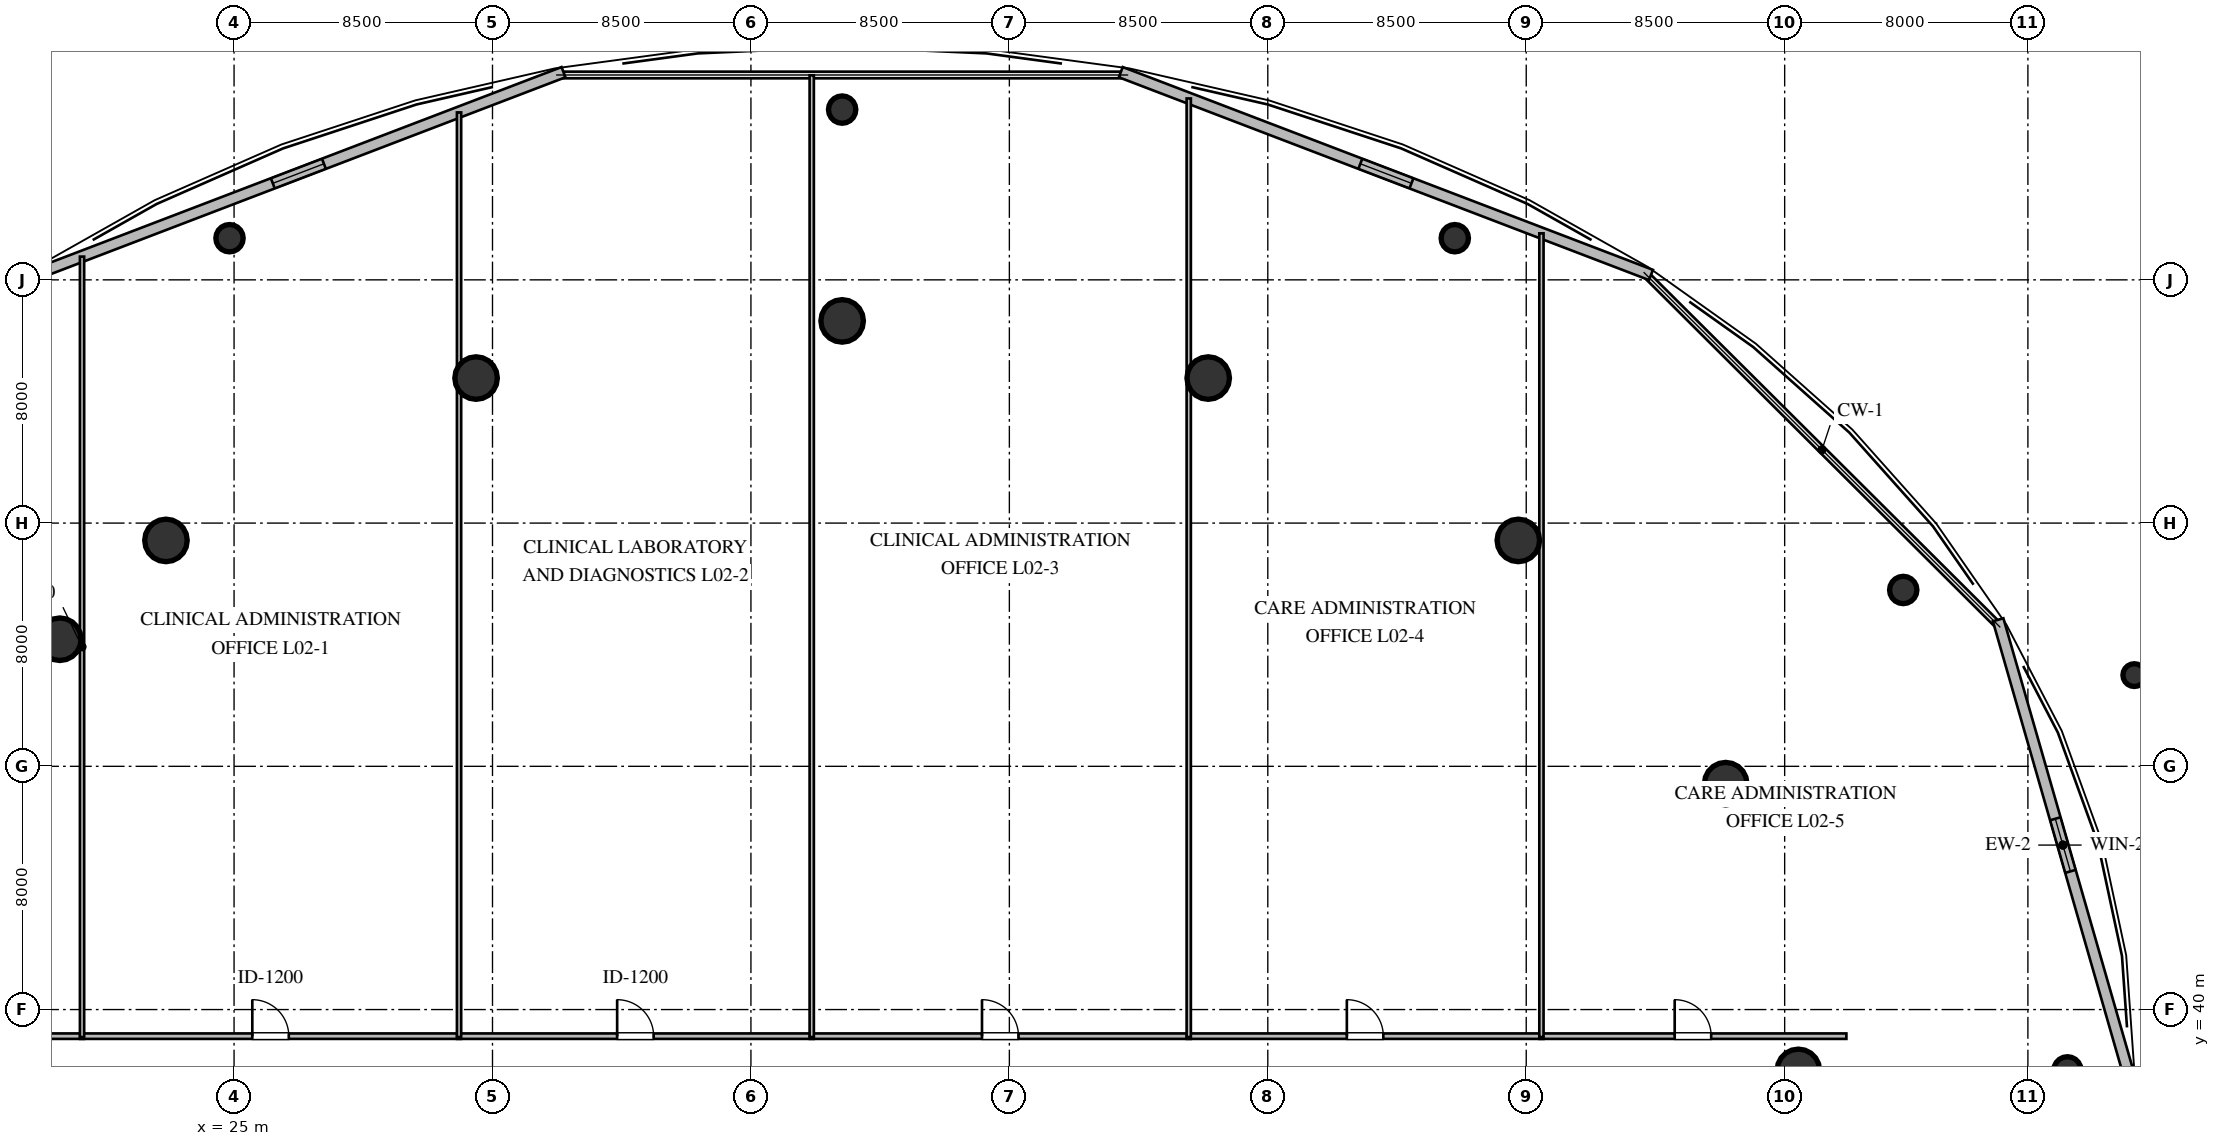
"""IFC4 building model, lengths in metres.
Left out: names, types, materials, properties, quantities, classifications, styles, units other than length and angle.
Written with IfcOpenShell. Run it as: python <this file> out.ifc"""

import sys

from ifc_helpers import new_model, si_unit, direction, frame, frame_2d, origin, origin_2d, place, context, subcontext, project, spatial, rectangle, circle, extrude, element, fill, save


model = new_model("IFC4")
c1 = context("Model", 3, precision=1e-05, world=origin(), true_north=direction((0.0, 1.0)))
c2 = subcontext(c1, "Body", "Model", "MODEL_VIEW")
j1 = project(units=[si_unit("LENGTHUNIT", "METRE"), si_unit("PLANEANGLEUNIT", "RADIAN")], contexts=[c1])
p1 = place(None, origin())
s1 = spatial("IfcSite", under=j1, at=p1, CompositionType="ELEMENT")
p2 = place(p1, origin())
s2 = spatial("IfcBuilding", under=s1, at=p2, CompositionType="ELEMENT")
p3 = place(p2, frame((0.0, 0.0, 9.6)))
s3 = spatial("IfcBuildingStorey", under=s2, at=p3, CompositionType="ELEMENT", Elevation=9.6)
for number, where, z_axis, x_axis in (
    (1, (76.45, 38.0, 0.0), (0.0, 0.0, 1.0), (1.0, 0.0, 0.0)),
    (2, (74.06, 47.43, 0.0), (0.0, 0.0, 1.0), (1.0, 0.0, 0.0)),
    (3, (67.24, 55.43, 0.0), (0.0, 0.0, 1.0), (1.0, 0.0, 0.0)),
    (4, (57.04, 60.77, 0.0), (0.0, 0.0, 1.0), (1.0, 0.0, 0.0)),
    (5, (45.0, 62.65, 0.0), (0.0, 0.0, 1.0), (1.0, 0.0, 0.0)),
    (6, (32.96, 60.77, 0.0), (0.0, 0.0, 1.0), (1.0, 0.0, 0.0)),
    (7, (22.76, 55.43, 0.0), (0.0, 0.0, 1.0), (1.0, 0.0, 0.0)),
    (8, (19.27, 52.18, 0.0), (0.0, 0.0, 1.0), (1.0, 0.0, 0.0)),
):
    element("IfcColumn", number, at=place(p3, frame(where, z_axis=z_axis, x_axis=x_axis)), inside=s3, PredefinedType="COLUMN", context=c2, shape_type="SweptSolid", body=[
        extrude(circle(Radius=0.7, at=origin_2d()), origin(), (0.0, 0.0, 1.0), 4.8),
    ])
for number, where, z_axis, x_axis in (
    (9, (85.3, 38.0, 0.0), (0.0, 0.0, 1.0), (1.0, 0.0, 0.0)),
    (10, (79.9, 53.8, 0.0), (0.0, 0.0, 1.0), (1.0, 0.0, 0.0)),
    (11, (65.15, 65.37, 0.0), (0.0, 0.0, 1.0), (1.0, 0.0, 0.0)),
    (12, (45.0, 69.6, 0.0), (0.0, 0.0, 1.0), (1.0, 0.0, 0.0)),
    (13, (24.85, 65.37, 0.0), (0.0, 0.0, 1.0), (1.0, 0.0, 0.0)),
):
    element("IfcColumn", number, at=place(p3, frame(where, z_axis=z_axis, x_axis=x_axis)), inside=s3, PredefinedType="COLUMN", context=c2, shape_type="SweptSolid", body=[
        extrude(circle(Radius=0.45, at=origin_2d()), origin(), (0.0, 0.0, 1.0), 4.8),
    ])
p4 = place(p3, frame((87.5, 51.0, 0.0), z_axis=(0.0, 0.0, 1.0), x_axis=(1.0, 0.0, 0.0)))
e14 = element("IfcColumn", 14, at=p4, inside=s3, PredefinedType="COLUMN", context=c2, shape_type="SweptSolid", body=[
    extrude(circle(Radius=0.375, at=origin_2d()), origin(), (0.0, 0.0, 1.0), 4.8),
])
p5 = place(p3, frame((87.28, 38.0, 0.0), z_axis=(0.0, 0.0, 1.0), x_axis=(-0.276203409751, 0.961099202186, 0.0)))
e15 = element("IfcWall", 15, at=p5, inside=s3, PredefinedType="STANDARD", context=c2, shape_type="SweptSolid", body=[
    extrude(rectangle(XDim=15.42, YDim=0.36, at=frame_2d((7.71, 0.0))), origin(), (0.0, 0.0, 1.0), 4.52),
])
p6 = place(p5, frame((6.81, 0.0, 1.05)))
e16 = element("IfcOpeningElement", 16, at=p6, cuts=e15, PredefinedType="OPENING", context=c2, shape_type="SweptSolid", body=[
    extrude(rectangle(XDim=1.8, YDim=1.7, at=frame_2d((0.9, 0.85))), frame((0.0, 0.19, 0.0), z_axis=(0.0, -1.0, 0.0), x_axis=(1.0, 0.0, 0.0)), (0.0, 0.0, 1.0), 0.38),
])
p7 = place(p3, frame((71.604, 64.161, 0.0), z_axis=(0.0, 0.0, 1.0), x_axis=(-0.934010262022, 0.357246176238, 0.0)))
e17 = element("IfcWall", 17, at=p7, inside=s3, PredefinedType="STANDARD", context=c2, shape_type="SweptSolid", body=[
    extrude(rectangle(XDim=18.671, YDim=0.36, at=frame_2d((9.335, 0.0))), origin(), (0.0, 0.0, 1.0), 4.52),
])
p8 = place(p7, frame((8.436, 0.0, 1.05)))
e18 = element("IfcOpeningElement", 18, at=p8, cuts=e17, PredefinedType="OPENING", context=c2, shape_type="SweptSolid", body=[
    extrude(rectangle(XDim=1.8, YDim=1.7, at=frame_2d((0.9, 0.85))), frame((0.0, 0.19, 0.0), z_axis=(0.0, -1.0, 0.0), x_axis=(1.0, 0.0, 0.0)), (0.0, 0.0, 1.0), 0.38),
])
p9 = place(p3, frame((35.835, 70.831, 0.0), z_axis=(0.0, 0.0, 1.0), x_axis=(-0.934010262022, -0.357246176238, 0.0)))
e19 = element("IfcWall", 19, at=p9, inside=s3, PredefinedType="STANDARD", context=c2, shape_type="SweptSolid", body=[
    extrude(rectangle(XDim=18.671, YDim=0.36, at=frame_2d((9.335, 0.0))), origin(), (0.0, 0.0, 1.0), 4.52),
])
p10 = place(p9, frame((8.436, 0.0, 1.05)))
e20 = element("IfcOpeningElement", 20, at=p10, cuts=e19, PredefinedType="OPENING", context=c2, shape_type="SweptSolid", body=[
    extrude(rectangle(XDim=1.8, YDim=1.7, at=frame_2d((0.9, 0.85))), frame((0.0, 0.19, 0.0), z_axis=(0.0, -1.0, 0.0), x_axis=(1.0, 0.0, 0.0)), (0.0, 0.0, 1.0), 0.38),
])
p11 = place(p3, frame((13.97, 39.125, 0.0), z_axis=(0.0, 0.0, 1.0), x_axis=(1.0, 0.0, 0.0)))
e21 = element("IfcWall", 21, at=p11, inside=s3, PredefinedType="PARTITIONING", context=c2, shape_type="SweptSolid", body=[
    extrude(rectangle(XDim=6.095, YDim=0.18, at=frame_2d((3.047, 0.0))), origin(), (0.0, 0.0, 1.0), 4.52),
])
p12 = place(p11, frame((2.447, 0.0, 0.0)))
e22 = element("IfcOpeningElement", 22, at=p12, cuts=e21, PredefinedType="OPENING", context=c2, shape_type="SweptSolid", body=[
    extrude(rectangle(XDim=1.2, YDim=2.15, at=frame_2d((0.6, 1.075))), frame((0.0, 0.1, 0.0), z_axis=(0.0, -1.0, 0.0), x_axis=(1.0, 0.0, 0.0)), (0.0, 0.0, 1.0), 0.2),
])
p13 = place(p3, frame((19.935, 39.125, 0.0), z_axis=(0.0, 0.0, 1.0), x_axis=(1.0, 0.0, 0.0)))
e23 = element("IfcWall", 23, at=p13, inside=s3, PredefinedType="PARTITIONING", context=c2, shape_type="SweptSolid", body=[
    extrude(rectangle(XDim=12.53, YDim=0.18, at=frame_2d((6.265, 0.0))), origin(), (0.0, 0.0, 1.0), 4.52),
])
p14 = place(p13, frame((5.665, 0.0, 0.0)))
e24 = element("IfcOpeningElement", 24, at=p14, cuts=e23, PredefinedType="OPENING", context=c2, shape_type="SweptSolid", body=[
    extrude(rectangle(XDim=1.2, YDim=2.15, at=frame_2d((0.6, 1.075))), frame((0.0, 0.1, 0.0), z_axis=(0.0, -1.0, 0.0), x_axis=(1.0, 0.0, 0.0)), (0.0, 0.0, 1.0), 0.2),
])
p15 = place(p3, frame((32.335, 39.125, 0.0), z_axis=(0.0, 0.0, 1.0), x_axis=(1.0, 0.0, 0.0)))
e25 = element("IfcWall", 25, at=p15, inside=s3, PredefinedType="PARTITIONING", context=c2, shape_type="SweptSolid", body=[
    extrude(rectangle(XDim=11.73, YDim=0.18, at=frame_2d((5.865, 0.0))), origin(), (0.0, 0.0, 1.0), 4.52),
])
p16 = place(p15, frame((5.265, 0.0, 0.0)))
e26 = element("IfcOpeningElement", 26, at=p16, cuts=e25, PredefinedType="OPENING", context=c2, shape_type="SweptSolid", body=[
    extrude(rectangle(XDim=1.2, YDim=2.15, at=frame_2d((0.6, 1.075))), frame((0.0, 0.1, 0.0), z_axis=(0.0, -1.0, 0.0), x_axis=(1.0, 0.0, 0.0)), (0.0, 0.0, 1.0), 0.2),
])
p17 = place(p3, frame((43.935, 39.125, 0.0), z_axis=(0.0, 0.0, 1.0), x_axis=(1.0, 0.0, 0.0)))
e27 = element("IfcWall", 27, at=p17, inside=s3, PredefinedType="PARTITIONING", context=c2, shape_type="SweptSolid", body=[
    extrude(rectangle(XDim=12.53, YDim=0.18, at=frame_2d((6.265, 0.0))), origin(), (0.0, 0.0, 1.0), 4.52),
])
p18 = place(p17, frame((5.665, 0.0, 0.0)))
e28 = element("IfcOpeningElement", 28, at=p18, cuts=e27, PredefinedType="OPENING", context=c2, shape_type="SweptSolid", body=[
    extrude(rectangle(XDim=1.2, YDim=2.15, at=frame_2d((0.6, 1.075))), frame((0.0, 0.1, 0.0), z_axis=(0.0, -1.0, 0.0), x_axis=(1.0, 0.0, 0.0)), (0.0, 0.0, 1.0), 0.2),
])
p19 = place(p3, frame((56.335, 39.125, 0.0), z_axis=(0.0, 0.0, 1.0), x_axis=(1.0, 0.0, 0.0)))
e29 = element("IfcWall", 29, at=p19, inside=s3, PredefinedType="PARTITIONING", context=c2, shape_type="SweptSolid", body=[
    extrude(rectangle(XDim=11.73, YDim=0.18, at=frame_2d((5.865, 0.0))), origin(), (0.0, 0.0, 1.0), 4.52),
])
p20 = place(p19, frame((5.265, 0.0, 0.0)))
e30 = element("IfcOpeningElement", 30, at=p20, cuts=e29, PredefinedType="OPENING", context=c2, shape_type="SweptSolid", body=[
    extrude(rectangle(XDim=1.2, YDim=2.15, at=frame_2d((0.6, 1.075))), frame((0.0, 0.1, 0.0), z_axis=(0.0, -1.0, 0.0), x_axis=(1.0, 0.0, 0.0)), (0.0, 0.0, 1.0), 0.2),
])
p21 = place(p3, frame((67.935, 39.125, 0.0), z_axis=(0.0, 0.0, 1.0), x_axis=(1.0, 0.0, 0.0)))
e31 = element("IfcWall", 31, at=p21, inside=s3, PredefinedType="PARTITIONING", context=c2, shape_type="SweptSolid", body=[
    extrude(rectangle(XDim=10.095, YDim=0.18, at=frame_2d((5.047, 0.0))), origin(), (0.0, 0.0, 1.0), 4.52),
])
p22 = place(p21, frame((4.448, 0.0, 0.0)))
e32 = element("IfcOpeningElement", 32, at=p22, cuts=e31, PredefinedType="OPENING", context=c2, shape_type="SweptSolid", body=[
    extrude(rectangle(XDim=1.2, YDim=2.15, at=frame_2d((0.6, 1.075))), frame((0.0, 0.1, 0.0), z_axis=(0.0, -1.0, 0.0), x_axis=(1.0, 0.0, 0.0)), (0.0, 0.0, 1.0), 0.2),
])
p23 = place(p3, frame((20.0, 64.764, 0.0), z_axis=(0.0, 0.0, 1.0), x_axis=(0.0, -1.0, 0.0)))
e33 = element("IfcWall", 33, at=p23, inside=s3, PredefinedType="PARTITIONING", context=c2, shape_type="SweptSolid", body=[
    extrude(rectangle(XDim=25.669, YDim=0.14, at=frame_2d((12.835, 0.0))), origin(), (0.0, 0.0, 1.0), 3.966),
])
p24 = place(p3, frame((32.4, 69.507, 0.0), z_axis=(0.0, 0.0, 1.0), x_axis=(0.0, -1.0, 0.0)))
e34 = element("IfcWall", 34, at=p24, inside=s3, PredefinedType="PARTITIONING", context=c2, shape_type="SweptSolid", body=[
    extrude(rectangle(XDim=30.412, YDim=0.14, at=frame_2d((15.206, 0.0))), origin(), (0.0, 0.0, 1.0), 3.966),
])
p25 = place(p3, frame((44.0, 70.728, 0.0), z_axis=(0.0, 0.0, 1.0), x_axis=(0.0, -1.0, 0.0)))
e35 = element("IfcWall", 35, at=p25, inside=s3, PredefinedType="PARTITIONING", context=c2, shape_type="SweptSolid", body=[
    extrude(rectangle(XDim=31.633, YDim=0.14, at=frame_2d((15.816, 0.0))), origin(), (0.0, 0.0, 1.0), 3.966),
])
p26 = place(p3, frame((56.4, 69.966, 0.0), z_axis=(0.0, 0.0, 1.0), x_axis=(0.0, -1.0, 0.0)))
e36 = element("IfcWall", 36, at=p26, inside=s3, PredefinedType="PARTITIONING", context=c2, shape_type="SweptSolid", body=[
    extrude(rectangle(XDim=30.871, YDim=0.14, at=frame_2d((15.436, 0.0))), origin(), (0.0, 0.0, 1.0), 4.52),
])
p27 = place(p3, frame((68.0, 65.529, 0.0), z_axis=(0.0, 0.0, 1.0), x_axis=(0.0, -1.0, 0.0)))
e37 = element("IfcWall", 37, at=p27, inside=s3, PredefinedType="PARTITIONING", context=c2, shape_type="SweptSolid", body=[
    extrude(rectangle(XDim=26.434, YDim=0.14, at=frame_2d((13.217, 0.0))), origin(), (0.0, 0.0, 1.0), 4.52),
])
p28 = place(p6, origin())
e38 = element("IfcWindow", 38, at=p28, inside=s3, PartitioningType="SINGLE_PANEL", PredefinedType="WINDOW", context=c2, shape_type="SweptSolid", body=[
    extrude(rectangle(XDim=1.8, YDim=1.7, at=frame_2d((0.9, 0.85))), frame((0.0, 0.03, 0.0), z_axis=(0.0, -1.0, 0.0), x_axis=(1.0, 0.0, 0.0)), (0.0, 0.0, 1.0), 0.06),
])
fill(e16, e38)
p29 = place(p8, origin())
e39 = element("IfcWindow", 39, at=p29, inside=s3, PartitioningType="SINGLE_PANEL", PredefinedType="WINDOW", context=c2, shape_type="SweptSolid", body=[
    extrude(rectangle(XDim=1.8, YDim=1.7, at=frame_2d((0.9, 0.85))), frame((0.0, 0.03, 0.0), z_axis=(0.0, -1.0, 0.0), x_axis=(1.0, 0.0, 0.0)), (0.0, 0.0, 1.0), 0.06),
])
fill(e18, e39)
p30 = place(p10, origin())
e40 = element("IfcWindow", 40, at=p30, inside=s3, PartitioningType="SINGLE_PANEL", PredefinedType="WINDOW", context=c2, shape_type="SweptSolid", body=[
    extrude(rectangle(XDim=1.8, YDim=1.7, at=frame_2d((0.9, 0.85))), frame((0.0, 0.03, 0.0), z_axis=(0.0, -1.0, 0.0), x_axis=(1.0, 0.0, 0.0)), (0.0, 0.0, 1.0), 0.06),
])
fill(e20, e40)
p31 = place(p14, origin())
e41 = element("IfcDoor", 41, at=p31, inside=s3, OperationType="SINGLE_SWING_LEFT", PredefinedType="DOOR", context=c2, shape_type="SweptSolid", body=[
    extrude(rectangle(XDim=1.2, YDim=2.15, at=frame_2d((0.6, 1.075))), frame((0.0, 0.025, 0.0), z_axis=(0.0, -1.0, 0.0), x_axis=(1.0, 0.0, 0.0)), (0.0, 0.0, 1.0), 0.05),
])
fill(e24, e41)
p32 = place(p16, origin())
e42 = element("IfcDoor", 42, at=p32, inside=s3, OperationType="SINGLE_SWING_LEFT", PredefinedType="DOOR", context=c2, shape_type="SweptSolid", body=[
    extrude(rectangle(XDim=1.2, YDim=2.15, at=frame_2d((0.6, 1.075))), frame((0.0, 0.025, 0.0), z_axis=(0.0, -1.0, 0.0), x_axis=(1.0, 0.0, 0.0)), (0.0, 0.0, 1.0), 0.05),
])
fill(e26, e42)
p33 = place(p18, origin())
e43 = element("IfcDoor", 43, at=p33, inside=s3, OperationType="SINGLE_SWING_LEFT", PredefinedType="DOOR", context=c2, shape_type="SweptSolid", body=[
    extrude(rectangle(XDim=1.2, YDim=2.15, at=frame_2d((0.6, 1.075))), frame((0.0, 0.025, 0.0), z_axis=(0.0, -1.0, 0.0), x_axis=(1.0, 0.0, 0.0)), (0.0, 0.0, 1.0), 0.05),
])
fill(e28, e43)
p34 = place(p20, origin())
e44 = element("IfcDoor", 44, at=p34, inside=s3, OperationType="SINGLE_SWING_LEFT", PredefinedType="DOOR", context=c2, shape_type="SweptSolid", body=[
    extrude(rectangle(XDim=1.2, YDim=2.15, at=frame_2d((0.6, 1.075))), frame((0.0, 0.025, 0.0), z_axis=(0.0, -1.0, 0.0), x_axis=(1.0, 0.0, 0.0)), (0.0, 0.0, 1.0), 0.05),
])
fill(e30, e44)
p35 = place(p22, origin())
e45 = element("IfcDoor", 45, at=p35, inside=s3, OperationType="SINGLE_SWING_LEFT", PredefinedType="DOOR", context=c2, shape_type="SweptSolid", body=[
    extrude(rectangle(XDim=1.2, YDim=2.15, at=frame_2d((0.6, 1.075))), frame((0.0, 0.025, 0.0), z_axis=(0.0, -1.0, 0.0), x_axis=(1.0, 0.0, 0.0)), (0.0, 0.0, 1.0), 0.05),
])
fill(e32, e45)
save(model, sys.argv[1])
